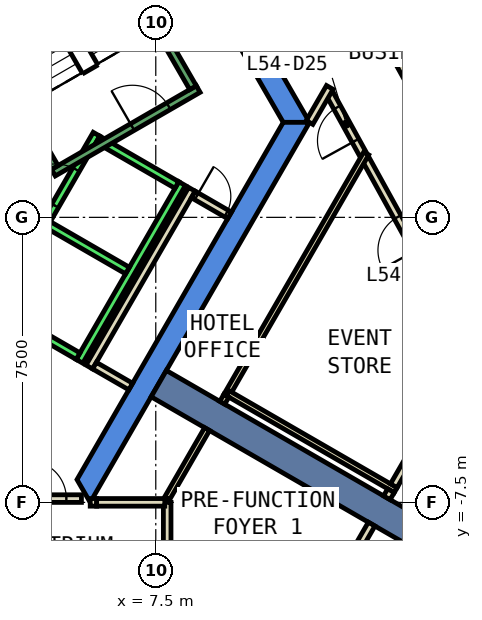
"""IFC4 building model, lengths in metres.
Left out: names, types, materials, properties, quantities, classifications, styles, units other than length and angle.
Written with IfcOpenShell. Run it as: python <this file> out.ifc"""

import sys

from ifc_helpers import new_model, si_unit, direction, frame, frame_2d, origin, place, context, subcontext, project, spatial, polyline, rectangle, outline, extrude, element, fill, save


model = new_model("IFC4")
c1 = context("Model", 3, precision=1e-05, world=origin(), true_north=direction((0.0, 1.0)))
c2 = subcontext(c1, "Body", "Model", "MODEL_VIEW")
j1 = project(units=[si_unit("LENGTHUNIT", "METRE"), si_unit("PLANEANGLEUNIT", "RADIAN")], contexts=[c1])
p1 = place(None, origin())
s1 = spatial("IfcSite", under=j1, at=p1, CompositionType="ELEMENT")
p2 = place(p1, origin())
s2 = spatial("IfcBuilding", under=s1, at=p2, CompositionType="ELEMENT")
p3 = place(p2, frame((0.0, 0.0, 241.4)))
s3 = spatial("IfcBuildingStorey", under=s2, at=p3, CompositionType="ELEMENT", Elevation=241.4)
p4 = place(p3, frame((0.0, 0.0, -0.6)))
e1 = element("IfcWall", 1, at=p4, inside=s3, PredefinedType="SHEAR", context=c2, shape_type="SweptSolid", body=[
    extrude(outline(polyline([(6.786, 10.747), (6.266, 10.447), (10.854, 2.5), (11.547, 2.5), (6.786, 10.747)])), origin(), (0.0, 0.0, 1.0), 3.86),
])
p5 = place(p3, frame((0.0, 0.0, -0.6)))
e2 = element("IfcWall", 2, at=p5, inside=s3, PredefinedType="SHEAR", context=c2, shape_type="SweptSolid", body=[
    extrude(outline(polyline([(5.774, -7.5), (11.547, 2.5), (10.854, 2.5), (5.427, -6.9), (5.774, -7.5)])), origin(), (0.0, 0.0, 1.0), 3.86),
])
p6 = place(p3, frame((7.578, -4.375, -0.6), z_axis=(0.0, 0.0, 1.0), x_axis=(0.866024315419, -0.5000018851, 0.0)))
e3 = element("IfcWall", 3, at=p6, inside=s3, PredefinedType="SHEAR", context=c2, shape_type="SweptSolid", body=[
    extrude(rectangle(XDim=9.0, YDim=0.8, at=frame_2d((4.5, 0.0))), origin(), (0.0, 0.0, 1.0), 3.86),
])
p7 = place(p3, frame((12.952, 1.661, 0.0), z_axis=(0.0, 0.0, 1.0), x_axis=(-0.482707835392, 0.875781448566, 0.0)))
e4 = element("IfcWall", 4, at=p7, inside=s3, PredefinedType="PARTITIONING", context=c2, shape_type="SweptSolid", body=[
    extrude(rectangle(XDim=1.817, YDim=0.2, at=frame_2d((0.908, 0.0))), origin(), (0.0, 0.0, 1.0), 3.26),
])
p8 = place(p7, frame((0.408, 0.0, 0.0)))
e5 = element("IfcOpeningElement", 5, at=p8, cuts=e4, PredefinedType="OPENING", context=c2, shape_type="SweptSolid", body=[
    extrude(rectangle(XDim=1.0, YDim=2.1, at=frame_2d((0.5, 1.05))), frame((0.0, 0.11, 0.0), z_axis=(0.0, -1.0, 0.0), x_axis=(1.0, 0.0, 0.0)), (0.0, 0.0, 1.0), 0.22),
])
p9 = place(p3, frame((12.079, 3.419, 0.0), z_axis=(0.0, 0.0, 1.0), x_axis=(-0.500674759037, -0.865635480825, 0.0)))
e6 = element("IfcWall", 6, at=p9, inside=s3, PredefinedType="PARTITIONING", context=c2, shape_type="SweptSolid", body=[
    extrude(rectangle(XDim=1.065, YDim=0.2, at=frame_2d((0.532, 0.0))), origin(), (0.0, 0.0, 1.0), 3.26),
])
p10 = place(p3, frame((15.186, -2.391, 0.0), z_axis=(0.0, 0.0, 1.0), x_axis=(-0.482858240592, 0.875698532311, 0.0)))
e7 = element("IfcWall", 7, at=p10, inside=s3, PredefinedType="PARTITIONING", context=c2, shape_type="SweptSolid", body=[
    extrude(rectangle(XDim=4.478, YDim=0.2, at=frame_2d((2.239, 0.0))), origin(), (0.0, 0.0, 1.0), 3.26),
])
p11 = place(p10, frame((1.739, 0.0, 0.0)))
e8 = element("IfcOpeningElement", 8, at=p11, cuts=e7, PredefinedType="OPENING", context=c2, shape_type="SweptSolid", body=[
    extrude(rectangle(XDim=1.0, YDim=2.1, at=frame_2d((0.5, 1.05))), frame((0.0, 0.11, 0.0), z_axis=(0.0, -1.0, 0.0), x_axis=(1.0, 0.0, 0.0)), (0.0, 0.0, 1.0), 0.22),
])
p12 = place(p3, frame((12.234, 6.977, 0.0), z_axis=(0.0, 0.0, 1.0), x_axis=(0.499820325382, -0.866129114125, 0.0)))
e9 = element("IfcWall", 9, at=p12, inside=s3, PredefinedType="PARTITIONING", context=c2, shape_type="SweptSolid", body=[
    extrude(rectangle(XDim=3.167, YDim=0.2, at=frame_2d((1.583, 0.0))), origin(), (0.0, 0.0, 1.0), 3.26),
])
p13 = place(p12, frame((1.084, 0.0, 0.0)))
e10 = element("IfcOpeningElement", 10, at=p13, cuts=e9, PredefinedType="OPENING", context=c2, shape_type="SweptSolid", body=[
    extrude(rectangle(XDim=1.0, YDim=2.1, at=frame_2d((0.5, 1.05))), frame((0.0, 0.11, 0.0), z_axis=(0.0, -1.0, 0.0), x_axis=(1.0, 0.0, 0.0)), (0.0, 0.0, 1.0), 0.22),
])
p14 = place(p3, frame((13.817, 4.234, 0.0), z_axis=(0.0, 0.0, 1.0), x_axis=(0.482871474341, -0.875691235121, 0.0)))
e11 = element("IfcWall", 11, at=p14, inside=s3, PredefinedType="PARTITIONING", context=c2, shape_type="SweptSolid", body=[
    extrude(rectangle(XDim=3.167, YDim=0.2, at=frame_2d((1.583, 0.0))), origin(), (0.0, 0.0, 1.0), 3.26),
])
p15 = place(p3, frame((5.751, -3.938, 0.0), z_axis=(0.0, 0.0, 1.0), x_axis=(0.500034260056, 0.866005622828, 0.0)))
e12 = element("IfcWall", 12, at=p15, inside=s3, PredefinedType="PARTITIONING", context=c2, shape_type="SweptSolid", body=[
    extrude(rectangle(XDim=5.399, YDim=0.2, at=frame_2d((2.7, 0.0))), origin(), (0.0, 0.0, 1.0), 3.26),
])
p16 = place(p3, frame((8.488, 0.602, 0.0), z_axis=(0.0, 0.0, 1.0), x_axis=(0.866063652425, -0.499933745558, 0.0)))
e13 = element("IfcWall", 13, at=p16, inside=s3, PredefinedType="PARTITIONING", context=c2, shape_type="SweptSolid", body=[
    extrude(rectangle(XDim=1.1, YDim=0.2, at=frame_2d((0.55, 0.0))), origin(), (0.0, 0.0, 1.0), 3.26),
])
p17 = place(p16, frame((0.1, 0.0, 0.0)))
e14 = element("IfcOpeningElement", 14, at=p17, cuts=e13, PredefinedType="OPENING", context=c2, shape_type="SweptSolid", body=[
    extrude(rectangle(XDim=0.9, YDim=2.1, at=frame_2d((0.45, 1.05))), frame((0.0, 0.11, 0.0), z_axis=(0.0, -1.0, 0.0), x_axis=(1.0, 0.0, 0.0)), (0.0, 0.0, 1.0), 0.22),
])
p18 = place(p3, frame((6.841, -4.452, 0.0), z_axis=(0.0, 0.0, 1.0), x_axis=(-0.86621513555, 0.499671230855, 0.0)))
e15 = element("IfcWall", 15, at=p18, inside=s3, PredefinedType="PARTITIONING", context=c2, shape_type="SweptSolid", body=[
    extrude(rectangle(XDim=1.1, YDim=0.2, at=frame_2d((0.55, 0.0))), origin(), (0.0, 0.0, 1.0), 3.26),
])
p19 = place(p3, frame((5.775, -7.499, 0.0), z_axis=(0.0, 0.0, 1.0), x_axis=(1.0, 0.0, 0.0)))
e16 = element("IfcWall", 16, at=p19, inside=s3, PredefinedType="PARTITIONING", context=c2, shape_type="SweptSolid", body=[
    extrude(rectangle(XDim=0.169, YDim=0.2, at=frame_2d((0.084, 0.0))), origin(), (0.0, 0.0, 1.0), 2.4),
])
p20 = place(p3, frame((7.8, -7.39, 0.0), z_axis=(0.0, 0.0, 1.0), x_axis=(0.499977374825, 0.866038466041, 0.0)))
e17 = element("IfcWall", 17, at=p20, inside=s3, PredefinedType="PARTITIONING", context=c2, shape_type="SweptSolid", body=[
    extrude(rectangle(XDim=2.1, YDim=0.15, at=frame_2d((1.05, 0.0))), origin(), (0.0, 0.0, 1.0), 3.26),
])
p21 = place(p3, frame((9.358, -4.692, 0.0), z_axis=(0.0, 0.0, 1.0), x_axis=(0.500027777314, 0.866009365951, 0.0)))
e18 = element("IfcWall", 18, at=p21, inside=s3, PredefinedType="PARTITIONING", context=c2, shape_type="SweptSolid", body=[
    extrude(rectangle(XDim=7.36, YDim=0.15, at=frame_2d((3.68, 0.0))), origin(), (0.0, 0.0, 1.0), 3.26),
])
p22 = place(p3, frame((7.8, -7.499, 0.0), z_axis=(0.0, 0.0, 1.0), x_axis=(0.0, -1.0, 0.0)))
e19 = element("IfcWall", 19, at=p22, inside=s3, PredefinedType="PARTITIONING", context=c2, shape_type="SweptSolid", body=[
    extrude(rectangle(XDim=4.604, YDim=0.2, at=frame_2d((2.302, 0.0))), origin(), (0.0, 0.0, 1.0), 3.26),
])
p23 = place(p22, frame((1.802, 0.0, 0.0)))
e20 = element("IfcOpeningElement", 20, at=p23, cuts=e19, PredefinedType="OPENING", context=c2, shape_type="SweptSolid", body=[
    extrude(rectangle(XDim=1.0, YDim=2.1, at=frame_2d((0.5, 1.05))), frame((0.0, 0.11, 0.0), z_axis=(0.0, -1.0, 0.0), x_axis=(1.0, 0.0, 0.0)), (0.0, 0.0, 1.0), 0.22),
])
p24 = place(p3, frame((9.395, -4.627, 0.0), z_axis=(0.0, 0.0, 1.0), x_axis=(0.866034131428, -0.499984882974, 0.0)))
e21 = element("IfcWall", 21, at=p24, inside=s3, PredefinedType="PARTITIONING", context=c2, shape_type="SweptSolid", body=[
    extrude(rectangle(XDim=5.1, YDim=0.15, at=frame_2d((2.55, 0.0))), origin(), (0.0, 0.0, 1.0), 3.26),
])
p25 = place(p3, frame((13.18, -8.071, 0.0), z_axis=(0.0, 0.0, 1.0), x_axis=(-0.499914724673, -0.86607463192, 0.0)))
e22 = element("IfcWall", 22, at=p25, inside=s3, PredefinedType="PARTITIONING", context=c2, shape_type="SweptSolid", body=[
    extrude(rectangle(XDim=4.507, YDim=0.2, at=frame_2d((2.253, 0.0))), origin(), (0.0, 0.0, 1.0), 3.26),
])
p26 = place(p3, frame((13.688, -7.192, 0.0), z_axis=(0.0, 0.0, 1.0), x_axis=(-0.499787711288, -0.866147934042, 0.0)))
e23 = element("IfcWall", 23, at=p26, inside=s3, PredefinedType="PARTITIONING", context=c2, shape_type="SweptSolid", body=[
    extrude(rectangle(XDim=0.216, YDim=0.2, at=frame_2d((0.108, 0.0))), origin(), (0.0, 0.0, 1.0), 3.26),
])
p27 = place(p3, frame((15.793, -3.546, 0.0), z_axis=(0.0, 0.0, 1.0), x_axis=(-0.500000064182, -0.866025366729, 0.0)))
e24 = element("IfcWall", 24, at=p27, inside=s3, PredefinedType="PARTITIONING", context=c2, shape_type="SweptSolid", body=[
    extrude(rectangle(XDim=4.06, YDim=0.2, at=frame_2d((2.03, 0.0))), origin(), (0.0, 0.0, 1.0), 3.26),
])
p28 = place(p3, frame((3.75, -7.4, 0.0), z_axis=(0.0, 0.0, 1.0), x_axis=(1.0, 0.0, 0.0)))
e25 = element("IfcWall", 25, at=p28, inside=s3, PredefinedType="PARTITIONING", context=c2, shape_type="SweptSolid", body=[
    extrude(rectangle(XDim=1.794, YDim=0.2, at=frame_2d((0.897, 0.0))), origin(), (0.0, 0.0, 1.0), 2.4),
])
p29 = place(p28, frame((0.397, 0.0, 0.0)))
e26 = element("IfcOpeningElement", 26, at=p29, cuts=e25, PredefinedType="OPENING", context=c2, shape_type="SweptSolid", body=[
    extrude(rectangle(XDim=1.0, YDim=2.1, at=frame_2d((0.5, 1.05))), frame((0.0, 0.11, 0.0), z_axis=(0.0, -1.0, 0.0), x_axis=(1.0, 0.0, 0.0)), (0.0, 0.0, 1.0), 0.22),
])
p30 = place(p3, frame((9.25, -4.879, 0.0), z_axis=(0.0, 0.0, 1.0), x_axis=(0.499787711288, 0.866147934042, 0.0)))
e27 = element("IfcWall", 27, at=p30, inside=s3, PredefinedType="PARTITIONING", context=c2, shape_type="SweptSolid", body=[
    extrude(rectangle(XDim=0.216, YDim=0.15, at=frame_2d((0.108, 0.0))), origin(), (0.0, 0.0, 1.0), 3.26),
])
p31 = place(p3, frame((5.944, -7.499, 0.0), z_axis=(0.0, 0.0, 1.0), x_axis=(1.0, 0.0, 0.0)))
e28 = element("IfcWall", 28, at=p31, inside=s3, PredefinedType="PARTITIONING", context=c2, shape_type="SweptSolid", body=[
    extrude(rectangle(XDim=1.793, YDim=0.2, at=frame_2d((0.896, 0.0))), origin(), (0.0, 0.0, 1.0), 3.26),
])
p32 = place(p3, frame((3.24, -2.488, 0.0), z_axis=(0.0, 0.0, 1.0), x_axis=(0.500034260056, 0.866005622828, 0.0)))
e29 = element("IfcWall", 29, at=p32, inside=s3, PredefinedType="STANDARD", context=c2, shape_type="SweptSolid", body=[
    extrude(rectangle(XDim=5.399, YDim=0.2, at=frame_2d((2.7, 0.0))), origin(), (0.0, 0.0, 1.0), 3.26),
])
p33 = place(p32, frame((3.225, 0.0, 0.0)))
e30 = element("IfcOpeningElement", 30, at=p33, cuts=e29, PredefinedType="OPENING", context=c2, shape_type="SweptSolid", body=[
    extrude(rectangle(XDim=1.1, YDim=2.1, at=frame_2d((0.55, 1.05))), frame((0.0, 0.11, 0.0), z_axis=(0.0, -1.0, 0.0), x_axis=(1.0, 0.0, 0.0)), (0.0, 0.0, 1.0), 0.22),
])
p34 = place(p32, frame((1.225, 0.0, 0.0)))
e31 = element("IfcOpeningElement", 31, at=p34, cuts=e29, PredefinedType="OPENING", context=c2, shape_type="SweptSolid", body=[
    extrude(rectangle(XDim=1.1, YDim=2.1, at=frame_2d((0.55, 1.05))), frame((0.0, 0.11, 0.0), z_axis=(0.0, -1.0, 0.0), x_axis=(1.0, 0.0, 0.0)), (0.0, 0.0, 1.0), 0.22),
])
p35 = place(p3, frame((5.492, -3.788, 0.0), z_axis=(0.0, 0.0, 1.0), x_axis=(0.500034260056, 0.866005622828, 0.0)))
e32 = element("IfcWall", 32, at=p35, inside=s3, PredefinedType="STANDARD", context=c2, shape_type="SweptSolid", body=[
    extrude(rectangle(XDim=5.399, YDim=0.2, at=frame_2d((2.7, 0.0))), origin(), (0.0, 0.0, 1.0), 3.26),
])
p36 = place(p3, frame((3.377, -2.452, 0.0), z_axis=(0.0, 0.0, 1.0), x_axis=(0.865955154139, -0.50012165622, 0.0)))
e33 = element("IfcWall", 33, at=p36, inside=s3, PredefinedType="STANDARD", context=c2, shape_type="SweptSolid", body=[
    extrude(rectangle(XDim=2.4, YDim=0.2, at=frame_2d((1.2, 0.0))), origin(), (0.0, 0.0, 1.0), 3.26),
])
for number, where, z_axis, x_axis in (
    (34, (4.677, -0.2, 0.0), (0.0, 0.0, 1.0), (0.866, -0.5, 0.0)),
    (35, (5.977, 2.052, 0.0), (0.0, 0.0, 1.0), (0.866, -0.5, 0.0)),
):
    element("IfcWall", number, at=place(p3, frame(where, z_axis=z_axis, x_axis=x_axis)), inside=s3, PredefinedType="STANDARD", context=c2, shape_type="SweptSolid", body=[
        extrude(rectangle(XDim=2.399, YDim=0.2, at=frame_2d((1.2, 0.0))), origin(), (0.0, 0.0, 1.0), 3.26),
    ])
p37 = place(p3, frame((4.806, 1.176, 0.0), z_axis=(0.0, 0.0, 1.0), x_axis=(0.866059941101, 0.499940174841, 0.0)))
e36 = element("IfcWall", 36, at=p37, inside=s3, PredefinedType="STANDARD", context=c2, shape_type="SweptSolid", body=[
    extrude(rectangle(XDim=4.4, YDim=0.2, at=frame_2d((2.2, 0.0))), origin(), (0.0, 0.0, 1.0), 3.26),
])
p38 = place(p37, frame((2.4, 0.0, 0.0)))
e37 = element("IfcOpeningElement", 37, at=p38, cuts=e36, PredefinedType="OPENING", context=c2, shape_type="SweptSolid", body=[
    extrude(rectangle(XDim=1.1, YDim=2.2, at=frame_2d((0.55, 1.1))), frame((0.0, 0.11, 0.0), z_axis=(0.0, -1.0, 0.0), x_axis=(1.0, 0.0, 0.0)), (0.0, 0.0, 1.0), 0.22),
])
p39 = place(p3, frame((4.843, 1.312, 0.0), z_axis=(0.0, 0.0, 1.0), x_axis=(-0.499963383562, 0.866046543262, 0.0)))
e38 = element("IfcWall", 38, at=p39, inside=s3, PredefinedType="STANDARD", context=c2, shape_type="SweptSolid", body=[
    extrude(rectangle(XDim=6.9, YDim=0.2, at=frame_2d((3.45, 0.0))), origin(), (0.0, 0.0, 1.0), 3.26),
])
p40 = place(p39, frame((0.45, 0.0, 0.0)))
e39 = element("IfcOpeningElement", 39, at=p40, cuts=e38, PredefinedType="OPENING", context=c2, shape_type="SweptSolid", body=[
    extrude(rectangle(XDim=1.1, YDim=2.2, at=frame_2d((0.55, 1.1))), frame((0.0, 0.11, 0.0), z_axis=(0.0, -1.0, 0.0), x_axis=(1.0, 0.0, 0.0)), (0.0, 0.0, 1.0), 0.22),
])
p41 = place(p3, frame((8.48, 3.412, 0.0), z_axis=(0.0, 0.0, 1.0), x_axis=(-0.499978703459, 0.866037698999, 0.0)))
e40 = element("IfcWall", 40, at=p41, inside=s3, PredefinedType="STANDARD", context=c2, shape_type="SweptSolid", body=[
    extrude(rectangle(XDim=6.9, YDim=0.2, at=frame_2d((3.45, 0.0))), origin(), (0.0, 0.0, 1.0), 3.26),
])
p42 = place(p11, origin())
e41 = element("IfcDoor", 41, at=p42, inside=s3, OperationType="SINGLE_SWING_LEFT", PredefinedType="DOOR", context=c2, shape_type="SweptSolid", body=[
    extrude(rectangle(XDim=1.0, YDim=2.1, at=frame_2d((0.5, 1.05))), frame((0.0, 0.025, 0.0), z_axis=(0.0, -1.0, 0.0), x_axis=(1.0, 0.0, 0.0)), (0.0, 0.0, 1.0), 0.05),
])
fill(e8, e41)
p43 = place(p8, origin())
e42 = element("IfcDoor", 42, at=p43, inside=s3, OperationType="SINGLE_SWING_RIGHT", PredefinedType="DOOR", context=c2, shape_type="SweptSolid", body=[
    extrude(rectangle(XDim=1.0, YDim=2.1, at=frame_2d((0.5, 1.05))), frame((0.0, 0.025, 0.0), z_axis=(0.0, -1.0, 0.0), x_axis=(1.0, 0.0, 0.0)), (0.0, 0.0, 1.0), 0.05),
])
fill(e5, e42)
p44 = place(p17, origin())
e43 = element("IfcDoor", 43, at=p44, inside=s3, OperationType="SINGLE_SWING_RIGHT", PredefinedType="DOOR", context=c2, shape_type="SweptSolid", body=[
    extrude(rectangle(XDim=0.9, YDim=2.1, at=frame_2d((0.45, 1.05))), frame((0.0, 0.025, 0.0), z_axis=(0.0, -1.0, 0.0), x_axis=(1.0, 0.0, 0.0)), (0.0, 0.0, 1.0), 0.05),
])
fill(e14, e43)
p45 = place(p29, origin())
e44 = element("IfcDoor", 44, at=p45, inside=s3, OperationType="SINGLE_SWING_LEFT", PredefinedType="DOOR", context=c2, shape_type="SweptSolid", body=[
    extrude(rectangle(XDim=1.0, YDim=2.1, at=frame_2d((0.5, 1.05))), frame((0.0, 0.025, 0.0), z_axis=(0.0, -1.0, 0.0), x_axis=(1.0, 0.0, 0.0)), (0.0, 0.0, 1.0), 0.05),
])
fill(e26, e44)
p46 = place(p33, origin())
e45 = element("IfcDoor", 45, at=p46, inside=s3, OperationType="SLIDING_TO_LEFT", PredefinedType="DOOR", context=c2, shape_type="SweptSolid", body=[
    extrude(rectangle(XDim=1.1, YDim=2.1, at=frame_2d((0.55, 1.05))), frame((0.0, 0.025, 0.0), z_axis=(0.0, -1.0, 0.0), x_axis=(1.0, 0.0, 0.0)), (0.0, 0.0, 1.0), 0.05),
])
fill(e30, e45)
p47 = place(p38, origin())
e46 = element("IfcDoor", 46, at=p47, inside=s3, OperationType="SINGLE_SWING_LEFT", PredefinedType="DOOR", context=c2, shape_type="SweptSolid", body=[
    extrude(rectangle(XDim=1.1, YDim=2.2, at=frame_2d((0.55, 1.1))), frame((0.0, 0.025, 0.0), z_axis=(0.0, -1.0, 0.0), x_axis=(1.0, 0.0, 0.0)), (0.0, 0.0, 1.0), 0.05),
])
fill(e37, e46)
save(model, sys.argv[1])
